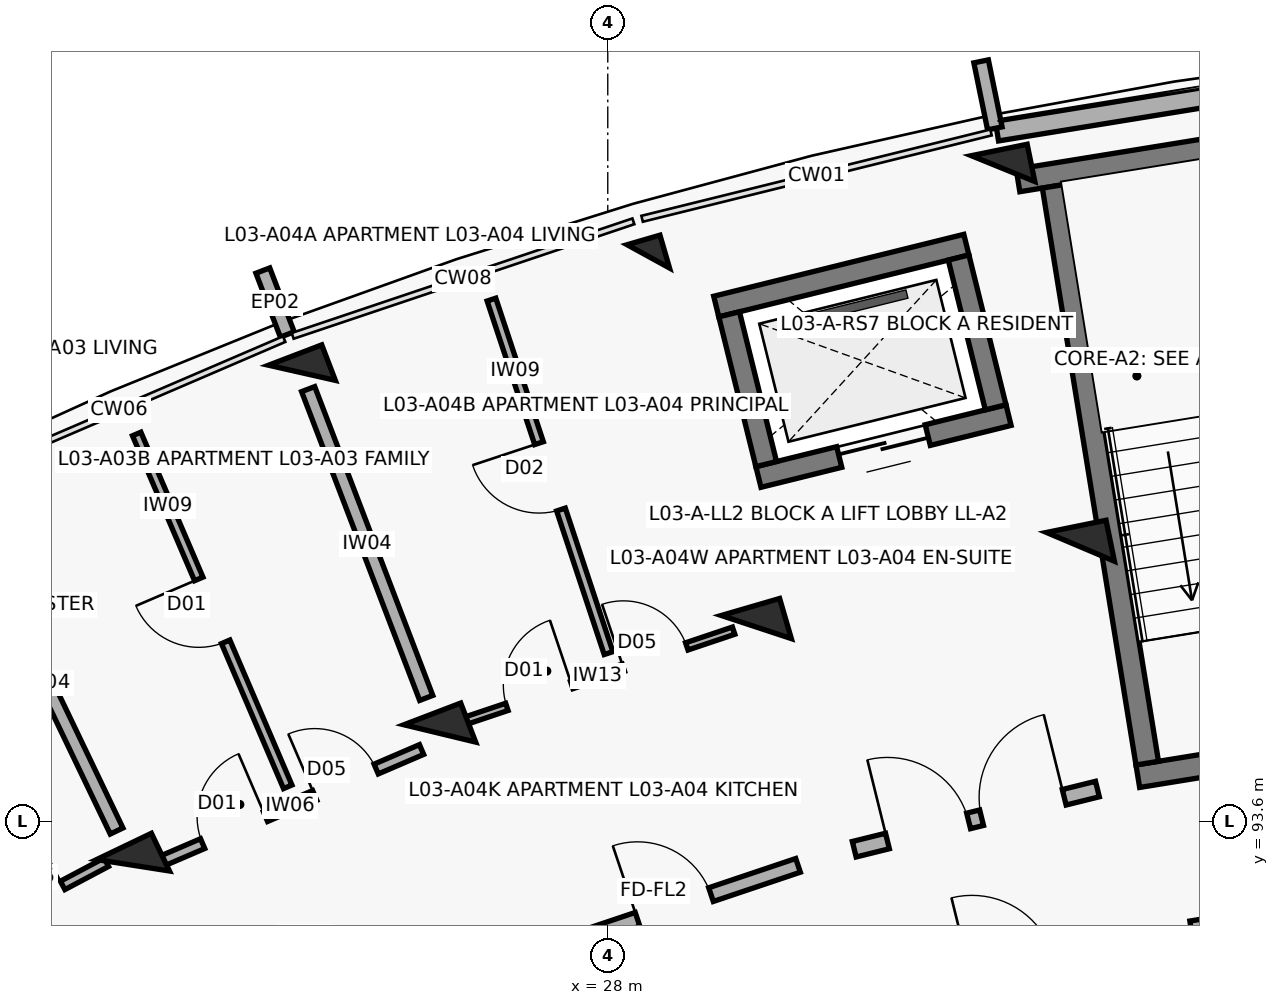
"""IFC4 building model, lengths in metres.
Left out: names, types, materials, properties, quantities, classifications, styles, units other than length and angle.
Written with IfcOpenShell. Run it as: python <this file> out.ifc"""

import sys

from ifc_helpers import new_model, si_unit, direction, frame, frame_2d, origin, origin_2d, place, context, subcontext, project, spatial, rectangle, extrude, element, fill, save


model = new_model("IFC4")
c1 = context("Model", 3, precision=1e-05, world=origin(), true_north=direction((0.0, 1.0)))
c2 = subcontext(c1, "Body", "Model", "MODEL_VIEW")
j1 = project(units=[si_unit("LENGTHUNIT", "METRE"), si_unit("PLANEANGLEUNIT", "RADIAN")], contexts=[c1])
p1 = place(None, origin())
s1 = spatial("IfcSite", under=j1, at=p1, CompositionType="ELEMENT")
p2 = place(p1, origin())
s2 = spatial("IfcBuilding", under=s1, at=p2, CompositionType="ELEMENT")
p3 = place(p2, frame((0.0, 0.0, 11.2)))
s3 = spatial("IfcBuildingStorey", under=s2, at=p3, CompositionType="ELEMENT", Elevation=11.2)
for number, where, z_axis, x_axis in (
    (1, (21.754, 93.019, 0.0), (0.0, 0.0, 1.0), (-0.432, 0.902, 0.0)),
    (2, (25.79, 94.753, 0.0), (0.0, 0.0, 1.0), (-0.357, 0.934, 0.0)),
):
    element("IfcColumn", number, at=place(p3, frame(where, z_axis=z_axis, x_axis=x_axis)), inside=s3, PredefinedType="COLUMN", context=c2, shape_type="SweptSolid", body=[
        extrude(rectangle(XDim=0.55, YDim=0.8, at=origin_2d()), origin(), (0.0, 0.0, 1.0), 3.1),
    ])
p4 = place(p3, frame((23.976, 99.499, 0.0), z_axis=(0.0, 0.0, 1.0), x_axis=(-0.357064076459, 0.934079892355, 0.0)))
e3 = element("IfcColumn", 3, at=p4, inside=s3, PredefinedType="COLUMN", context=c2, shape_type="SweptSolid", body=[
    extrude(rectangle(XDim=0.5, YDim=0.75, at=origin_2d()), origin(), (0.0, 0.0, 1.0), 3.1),
])
p5 = place(p3, frame((29.954, 96.153, 0.0), z_axis=(0.0, 0.0, 1.0), x_axis=(-0.27966144946, 0.96009867914, 0.0)))
e4 = element("IfcColumn", 4, at=p5, inside=s3, PredefinedType="COLUMN", context=c2, shape_type="SweptSolid", body=[
    extrude(rectangle(XDim=0.55, YDim=0.8, at=origin_2d()), origin(), (0.0, 0.0, 1.0), 3.1),
])
p6 = place(p3, frame((28.533, 101.031, 0.0), z_axis=(0.0, 0.0, 1.0), x_axis=(-0.27966144946, 0.96009867914, 0.0)))
e5 = element("IfcColumn", 5, at=p6, inside=s3, PredefinedType="COLUMN", context=c2, shape_type="SweptSolid", body=[
    extrude(rectangle(XDim=0.45, YDim=0.45, at=origin_2d()), origin(), (0.0, 0.0, 1.0), 3.1),
])
p7 = place(p3, frame((34.219, 97.209, 0.0), z_axis=(0.0, 0.0, 1.0), x_axis=(-0.200393999665, 0.979715389742, 0.0)))
e6 = element("IfcColumn", 6, at=p7, inside=s3, PredefinedType="COLUMN", context=c2, shape_type="SweptSolid", body=[
    extrude(rectangle(XDim=0.55, YDim=0.8, at=origin_2d()), origin(), (0.0, 0.0, 1.0), 3.1),
])
p8 = place(p3, frame((33.201, 102.186, 0.0), z_axis=(0.0, 0.0, 1.0), x_axis=(-0.200393999665, 0.979715389742, 0.0)))
e7 = element("IfcColumn", 7, at=p8, inside=s3, PredefinedType="COLUMN", context=c2, shape_type="SweptSolid", body=[
    extrude(rectangle(XDim=0.5, YDim=0.75, at=origin_2d()), origin(), (0.0, 0.0, 1.0), 3.1),
])
p9 = place(p3, frame((23.783, 100.003, 0.0), z_axis=(0.0, 0.0, 1.0), x_axis=(-0.356942580168, 0.934126326823, 0.0)))
e8 = element("IfcWall", 8, at=p9, inside=s3, PredefinedType="PARAPET", context=c2, shape_type="SweptSolid", body=[
    extrude(rectangle(XDim=0.9, YDim=0.195, at=frame_2d((0.45, 0.0))), origin(), (0.0, 0.0, 1.0), 2.25),
])
p10 = place(p3, frame((33.12, 102.679, 0.0), z_axis=(0.0, 0.0, 1.0), x_axis=(0.987080750493, 0.160223568819, 0.0)))
e9 = element("IfcWall", 9, at=p10, inside=s3, PredefinedType="SOLIDWALL", context=c2, shape_type="SweptSolid", body=[
    extrude(rectangle(XDim=4.809, YDim=0.262, at=frame_2d((2.404, 0.0))), origin(), (0.0, 0.0, 1.0), 2.25),
])
p11 = place(p3, frame((33.093, 102.715, 0.0), z_axis=(0.0, 0.0, 1.0), x_axis=(-0.200183211319, 0.979758481416, 0.0)))
e10 = element("IfcWall", 10, at=p11, inside=s3, PredefinedType="PARAPET", context=c2, shape_type="SweptSolid", body=[
    extrude(rectangle(XDim=0.9, YDim=0.195, at=frame_2d((0.45, 0.0))), origin(), (0.0, 0.0, 1.0), 2.25),
])
p12 = place(p3, frame((38.794, 94.811, 0.0), z_axis=(0.0, 0.0, 1.0), x_axis=(-0.987077443397, -0.160243941341, 0.0)))
e11 = element("IfcWall", 11, at=p12, inside=s3, PredefinedType="SHEAR", context=c2, shape_type="SweptSolid", body=[
    extrude(rectangle(XDim=3.87, YDim=0.3, at=frame_2d((1.935, 0.0))), origin(), (0.0, 0.0, 1.0), 3.1),
])
p13 = place(p12, frame((1.435, 0.0, 0.0)))
e12 = element("IfcOpeningElement", 12, at=p13, cuts=e11, PredefinedType="OPENING", context=c2, shape_type="SweptSolid", body=[
    extrude(rectangle(XDim=1.0, YDim=2.15, at=frame_2d((0.5, 1.075))), frame((0.0, 0.16, 0.0), z_axis=(0.0, -1.0, 0.0), x_axis=(1.0, 0.0, 0.0)), (0.0, 0.0, 1.0), 0.32),
])
p14 = place(p3, frame((37.81, 102.745, 0.0), z_axis=(0.0, 0.0, 1.0), x_axis=(-0.987084710126, -0.160199173019, 0.0)))
e13 = element("IfcWall", 13, at=p14, inside=s3, PredefinedType="SHEAR", context=c2, shape_type="SweptSolid", body=[
    extrude(rectangle(XDim=4.47, YDim=0.3, at=frame_2d((2.235, 0.0))), origin(), (0.0, 0.0, 1.0), 3.1),
])
p15 = place(p3, frame((35.098, 94.363, 0.0), z_axis=(0.0, 0.0, 1.0), x_axis=(-0.160227496777, 0.987080112897, 0.0)))
e14 = element("IfcWall", 14, at=p15, inside=s3, PredefinedType="SHEAR", context=c2, shape_type="SweptSolid", body=[
    extrude(rectangle(XDim=7.69, YDim=0.3, at=frame_2d((3.845, 0.0))), origin(), (0.0, 0.0, 1.0), 3.1),
])
p16 = place(p3, frame((33.273, 98.942, 0.0), z_axis=(0.0, 0.0, 1.0), x_axis=(-0.970707542441, -0.240264160972, 0.0)))
e15 = element("IfcWall", 15, at=p16, inside=s3, PredefinedType="SHEAR", context=c2, shape_type="SweptSolid", body=[
    extrude(rectangle(XDim=3.39, YDim=0.28, at=frame_2d((1.695, 0.0))), origin(), (0.0, 0.0, 1.0), 3.1),
])
p17 = place(p16, frame((1.095, 0.0, 0.0)))
e16 = element("IfcOpeningElement", 16, at=p17, cuts=e15, PredefinedType="OPENING", context=c2, shape_type="SweptSolid", body=[
    extrude(rectangle(XDim=1.2, YDim=2.15, at=frame_2d((0.6, 1.075))), frame((0.0, 0.15, 0.0), z_axis=(0.0, -1.0, 0.0), x_axis=(1.0, 0.0, 0.0)), (0.0, 0.0, 1.0), 0.3),
])
p18 = place(p3, frame((32.718, 101.185, 0.0), z_axis=(0.0, 0.0, 1.0), x_axis=(-0.970711699588, -0.240247364777, 0.0)))
e17 = element("IfcWall", 17, at=p18, inside=s3, PredefinedType="SHEAR", context=c2, shape_type="SweptSolid", body=[
    extrude(rectangle(XDim=3.39, YDim=0.28, at=frame_2d((1.695, 0.0))), origin(), (0.0, 0.0, 1.0), 3.1),
])
p19 = place(p3, frame((33.104, 99.044, 0.0), z_axis=(0.0, 0.0, 1.0), x_axis=(-0.240186044774, 0.970726873995, 0.0)))
e18 = element("IfcWall", 18, at=p19, inside=s3, PredefinedType="SHEAR", context=c2, shape_type="SweptSolid", body=[
    extrude(rectangle(XDim=2.03, YDim=0.28, at=frame_2d((1.015, 0.0))), origin(), (0.0, 0.0, 1.0), 3.1),
])
p20 = place(p3, frame((30.085, 98.297, 0.0), z_axis=(0.0, 0.0, 1.0), x_axis=(-0.2402993748, 0.970698825832, 0.0)))
e19 = element("IfcWall", 19, at=p20, inside=s3, PredefinedType="SHEAR", context=c2, shape_type="SweptSolid", body=[
    extrude(rectangle(XDim=2.03, YDim=0.28, at=frame_2d((1.015, 0.0))), origin(), (0.0, 0.0, 1.0), 3.1),
])
p21 = place(p3, frame((18.037, 91.273, 0.0), z_axis=(0.0, 0.0, 1.0), x_axis=(0.883441603894, 0.468541281543, 0.0)))
e20 = element("IfcWall", 20, at=p21, inside=s3, PredefinedType="PARTITIONING", context=c2, shape_type="SweptSolid", body=[
    extrude(rectangle(XDim=3.81, YDim=0.125, at=frame_2d((1.905, 0.0))), origin(), (0.0, 0.0, 1.0), 2.08),
])
p22 = place(p21, frame((0.65, 0.0, 0.0)))
e21 = element("IfcOpeningElement", 21, at=p22, cuts=e20, PredefinedType="OPENING", context=c2, shape_type="SweptSolid", body=[
    extrude(rectangle(XDim=0.9, YDim=2.1, at=frame_2d((0.45, 1.05))), frame((0.0, 0.073, 0.0), z_axis=(0.0, -1.0, 0.0), x_axis=(1.0, 0.0, 0.0)), (0.0, 0.0, 1.0), 0.145),
])
p23 = place(p21, frame((2.28, 0.0, 0.0)))
e22 = element("IfcOpeningElement", 22, at=p23, cuts=e20, PredefinedType="OPENING", context=c2, shape_type="SweptSolid", body=[
    extrude(rectangle(XDim=0.88, YDim=2.1, at=frame_2d((0.44, 1.05))), frame((0.0, 0.073, 0.0), z_axis=(0.0, -1.0, 0.0), x_axis=(1.0, 0.0, 0.0)), (0.0, 0.0, 1.0), 0.145),
])
p24 = place(p3, frame((22.073, 93.047, 0.0), z_axis=(0.0, 0.0, 1.0), x_axis=(0.918737522346, 0.394868794707, 0.0)))
e23 = element("IfcWall", 23, at=p24, inside=s3, PredefinedType="PARTITIONING", context=c2, shape_type="SweptSolid", body=[
    extrude(rectangle(XDim=3.785, YDim=0.14, at=frame_2d((1.893, 0.0))), origin(), (0.0, 0.0, 1.0), 2.08),
])
p25 = place(p24, frame((0.65, 0.0, 0.0)))
e24 = element("IfcOpeningElement", 24, at=p25, cuts=e23, PredefinedType="OPENING", context=c2, shape_type="SweptSolid", body=[
    extrude(rectangle(XDim=0.9, YDim=2.1, at=frame_2d((0.45, 1.05))), frame((0.0, 0.08, 0.0), z_axis=(0.0, -1.0, 0.0), x_axis=(1.0, 0.0, 0.0)), (0.0, 0.0, 1.0), 0.16),
])
p26 = place(p24, frame((2.255, 0.0, 0.0)))
e25 = element("IfcOpeningElement", 25, at=p26, cuts=e23, PredefinedType="OPENING", context=c2, shape_type="SweptSolid", body=[
    extrude(rectangle(XDim=0.88, YDim=2.1, at=frame_2d((0.44, 1.05))), frame((0.0, 0.08, 0.0), z_axis=(0.0, -1.0, 0.0), x_axis=(1.0, 0.0, 0.0)), (0.0, 0.0, 1.0), 0.16),
])
p27 = place(p3, frame((23.789, 94.051, 0.0), z_axis=(0.0, 0.0, 1.0), x_axis=(-0.393539995583, 0.919307495823, 0.0)))
e26 = element("IfcWall", 26, at=p27, inside=s3, PredefinedType="PARTITIONING", context=c2, shape_type="SweptSolid", body=[
    extrude(rectangle(XDim=5.05, YDim=0.12, at=frame_2d((2.525, 0.0))), origin(), (0.0, 0.0, 1.0), 2.08),
])
p28 = place(p27, frame((2.075, 0.0, 0.0)))
e27 = element("IfcOpeningElement", 27, at=p28, cuts=e26, PredefinedType="OPENING", context=c2, shape_type="SweptSolid", body=[
    extrude(rectangle(XDim=0.9, YDim=2.1, at=frame_2d((0.45, 1.05))), frame((0.0, 0.07, 0.0), z_axis=(0.0, -1.0, 0.0), x_axis=(1.0, 0.0, 0.0)), (0.0, 0.0, 1.0), 0.14),
])
p29 = place(p3, frame((21.538, 93.469, 0.0), z_axis=(0.0, 0.0, 1.0), x_axis=(-0.432086898897, 0.901831975371, 0.0)))
e28 = element("IfcWall", 28, at=p29, inside=s3, PredefinedType="SOLIDWALL", context=c2, shape_type="SweptSolid", body=[
    extrude(rectangle(XDim=4.35, YDim=0.185, at=frame_2d((2.175, 0.0))), origin(), (0.0, 0.0, 1.0), 2.08),
])
p30 = place(p3, frame((27.247, 91.923, 0.0), z_axis=(0.0, 0.0, 1.0), x_axis=(0.947863007629, 0.318678080151, 0.0)))
e29 = element("IfcWall", 29, at=p30, inside=s3, PredefinedType="SOLIDWALL", context=c2, shape_type="SweptSolid", body=[
    extrude(rectangle(XDim=3.436, YDim=0.19, at=frame_2d((1.718, 0.0))), origin(), (0.0, 0.0, 1.0), 2.08),
])
p31 = place(p30, frame((1.208, 0.0, 0.0)))
e30 = element("IfcOpeningElement", 30, at=p31, cuts=e29, PredefinedType="OPENING", context=c2, shape_type="SweptSolid", body=[
    extrude(rectangle(XDim=1.02, YDim=2.15, at=frame_2d((0.51, 1.075))), frame((0.0, 0.105, 0.0), z_axis=(0.0, -1.0, 0.0), x_axis=(1.0, 0.0, 0.0)), (0.0, 0.0, 1.0), 0.21),
])
p32 = place(p3, frame((26.056, 94.896, 0.0), z_axis=(0.0, 0.0, 1.0), x_axis=(0.947876567739, 0.318637744673, 0.0)))
e31 = element("IfcWall", 31, at=p32, inside=s3, PredefinedType="PARTITIONING", context=c2, shape_type="SweptSolid", body=[
    extrude(rectangle(XDim=3.797, YDim=0.1, at=frame_2d((1.899, 0.0))), origin(), (0.0, 0.0, 1.0), 2.08),
])
p33 = place(p32, frame((0.65, 0.0, 0.0)))
e32 = element("IfcOpeningElement", 32, at=p33, cuts=e31, PredefinedType="OPENING", context=c2, shape_type="SweptSolid", body=[
    extrude(rectangle(XDim=0.9, YDim=2.1, at=frame_2d((0.45, 1.05))), frame((0.0, 0.06, 0.0), z_axis=(0.0, -1.0, 0.0), x_axis=(1.0, 0.0, 0.0)), (0.0, 0.0, 1.0), 0.12),
])
p34 = place(p32, frame((2.267, 0.0, 0.0)))
e33 = element("IfcOpeningElement", 33, at=p34, cuts=e31, PredefinedType="OPENING", context=c2, shape_type="SweptSolid", body=[
    extrude(rectangle(XDim=0.88, YDim=2.1, at=frame_2d((0.44, 1.05))), frame((0.0, 0.06, 0.0), z_axis=(0.0, -1.0, 0.0), x_axis=(1.0, 0.0, 0.0)), (0.0, 0.0, 1.0), 0.12),
])
p35 = place(p3, frame((28.01, 95.81, 0.0), z_axis=(0.0, 0.0, 1.0), x_axis=(-0.314343770763, 0.949309219266, 0.0)))
e34 = element("IfcWall", 34, at=p35, inside=s3, PredefinedType="PARTITIONING", context=c2, shape_type="SweptSolid", body=[
    extrude(rectangle(XDim=4.9, YDim=0.12, at=frame_2d((2.45, 0.0))), origin(), (0.0, 0.0, 1.0), 2.08),
])
p36 = place(p35, frame((1.99, 0.0, 0.0)))
e35 = element("IfcOpeningElement", 35, at=p36, cuts=e34, PredefinedType="OPENING", context=c2, shape_type="SweptSolid", body=[
    extrude(rectangle(XDim=0.92, YDim=2.1, at=frame_2d((0.46, 1.05))), frame((0.0, 0.07, 0.0), z_axis=(0.0, -1.0, 0.0), x_axis=(1.0, 0.0, 0.0)), (0.0, 0.0, 1.0), 0.14),
])
p37 = place(p3, frame((25.611, 95.22, 0.0), z_axis=(0.0, 0.0, 1.0), x_axis=(-0.357064016205, 0.934079915388, 0.0)))
e36 = element("IfcWall", 36, at=p37, inside=s3, PredefinedType="SOLIDWALL", context=c2, shape_type="SweptSolid", body=[
    extrude(rectangle(XDim=4.35, YDim=0.185, at=frame_2d((2.175, 0.0))), origin(), (0.0, 0.0, 1.0), 2.08),
])
p38 = place(p3, frame((31.243, 93.23, 0.0), z_axis=(0.0, 0.0, 1.0), x_axis=(0.970719238682, 0.240216901263, 0.0)))
e37 = element("IfcWall", 37, at=p38, inside=s3, PredefinedType="SOLIDWALL", context=c2, shape_type="SweptSolid", body=[
    extrude(rectangle(XDim=3.296, YDim=0.21, at=frame_2d((1.648, 0.0))), origin(), (0.0, 0.0, 1.0), 2.08),
])
p39 = place(p38, frame((0.45, 0.0, 0.0)))
e38 = element("IfcOpeningElement", 38, at=p39, cuts=e37, PredefinedType="OPENING", context=c2, shape_type="SweptSolid", body=[
    extrude(rectangle(XDim=1.1, YDim=2.15, at=frame_2d((0.55, 1.075))), frame((0.0, 0.115, 0.0), z_axis=(0.0, -1.0, 0.0), x_axis=(1.0, 0.0, 0.0)), (0.0, 0.0, 1.0), 0.23),
])
p40 = place(p38, frame((1.726, 0.0, 0.0)))
e39 = element("IfcOpeningElement", 39, at=p40, cuts=e37, PredefinedType="OPENING", context=c2, shape_type="SweptSolid", body=[
    extrude(rectangle(XDim=1.12, YDim=2.15, at=frame_2d((0.56, 1.075))), frame((0.0, 0.115, 0.0), z_axis=(0.0, -1.0, 0.0), x_axis=(1.0, 0.0, 0.0)), (0.0, 0.0, 1.0), 0.23),
])
p41 = place(p3, frame((35.676, 92.181, 0.0), z_axis=(0.0, 0.0, 1.0), x_axis=(0.98707079686, 0.160284877599, 0.0)))
e40 = element("IfcWall", 40, at=p41, inside=s3, PredefinedType="SOLIDWALL", context=c2, shape_type="SweptSolid", body=[
    extrude(rectangle(XDim=3.129, YDim=0.21, at=frame_2d((1.564, 0.0))), origin(), (0.0, 0.0, 1.0), 2.08),
])
p42 = place(p41, frame((1.014, 0.0, 0.0)))
e41 = element("IfcOpeningElement", 41, at=p42, cuts=e40, PredefinedType="OPENING", context=c2, shape_type="SweptSolid", body=[
    extrude(rectangle(XDim=1.1, YDim=2.15, at=frame_2d((0.55, 1.075))), frame((0.0, 0.115, 0.0), z_axis=(0.0, -1.0, 0.0), x_axis=(1.0, 0.0, 0.0)), (0.0, 0.0, 1.0), 0.23),
])
p43 = place(p17, origin())
e42 = element("IfcDoor", 42, at=p43, inside=s3, OperationType="DOUBLE_DOOR_SLIDING", PredefinedType="DOOR", context=c2, shape_type="SweptSolid", body=[
    extrude(rectangle(XDim=1.2, YDim=2.15, at=frame_2d((0.6, 1.075))), frame((0.0, 0.025, 0.0), z_axis=(0.0, -1.0, 0.0), x_axis=(1.0, 0.0, 0.0)), (0.0, 0.0, 1.0), 0.05),
])
fill(e16, e42)
p44 = place(p23, origin())
e43 = element("IfcDoor", 43, at=p44, inside=s3, OperationType="SINGLE_SWING_RIGHT", PredefinedType="DOOR", context=c2, shape_type="SweptSolid", body=[
    extrude(rectangle(XDim=0.88, YDim=2.1, at=frame_2d((0.44, 1.05))), frame((0.0, 0.025, 0.0), z_axis=(0.0, -1.0, 0.0), x_axis=(1.0, 0.0, 0.0)), (0.0, 0.0, 1.0), 0.05),
])
fill(e22, e43)
p45 = place(p25, origin())
e44 = element("IfcDoor", 44, at=p45, inside=s3, OperationType="SINGLE_SWING_RIGHT", PredefinedType="DOOR", context=c2, shape_type="SweptSolid", body=[
    extrude(rectangle(XDim=0.9, YDim=2.1, at=frame_2d((0.45, 1.05))), frame((0.0, 0.025, 0.0), z_axis=(0.0, -1.0, 0.0), x_axis=(1.0, 0.0, 0.0)), (0.0, 0.0, 1.0), 0.05),
])
fill(e24, e44)
p46 = place(p26, origin())
e45 = element("IfcDoor", 45, at=p46, inside=s3, OperationType="SINGLE_SWING_LEFT", PredefinedType="DOOR", context=c2, shape_type="SweptSolid", body=[
    extrude(rectangle(XDim=0.88, YDim=2.1, at=frame_2d((0.44, 1.05))), frame((0.0, 0.025, 0.0), z_axis=(0.0, -1.0, 0.0), x_axis=(1.0, 0.0, 0.0)), (0.0, 0.0, 1.0), 0.05),
])
fill(e25, e45)
p47 = place(p28, origin())
e46 = element("IfcDoor", 46, at=p47, inside=s3, OperationType="SINGLE_SWING_RIGHT", PredefinedType="DOOR", context=c2, shape_type="SweptSolid", body=[
    extrude(rectangle(XDim=0.9, YDim=2.1, at=frame_2d((0.45, 1.05))), frame((0.0, 0.025, 0.0), z_axis=(0.0, -1.0, 0.0), x_axis=(1.0, 0.0, 0.0)), (0.0, 0.0, 1.0), 0.05),
])
fill(e27, e46)
p48 = place(p31, origin())
e47 = element("IfcDoor", 47, at=p48, inside=s3, OperationType="SINGLE_SWING_LEFT", PredefinedType="DOOR", context=c2, shape_type="SweptSolid", body=[
    extrude(rectangle(XDim=1.02, YDim=2.15, at=frame_2d((0.51, 1.075))), frame((0.0, 0.025, 0.0), z_axis=(0.0, -1.0, 0.0), x_axis=(1.0, 0.0, 0.0)), (0.0, 0.0, 1.0), 0.05),
])
fill(e30, e47)
p49 = place(p33, origin())
e48 = element("IfcDoor", 48, at=p49, inside=s3, OperationType="SINGLE_SWING_RIGHT", PredefinedType="DOOR", context=c2, shape_type="SweptSolid", body=[
    extrude(rectangle(XDim=0.9, YDim=2.1, at=frame_2d((0.45, 1.05))), frame((0.0, 0.025, 0.0), z_axis=(0.0, -1.0, 0.0), x_axis=(1.0, 0.0, 0.0)), (0.0, 0.0, 1.0), 0.05),
])
fill(e32, e48)
p50 = place(p34, origin())
e49 = element("IfcDoor", 49, at=p50, inside=s3, OperationType="SINGLE_SWING_LEFT", PredefinedType="DOOR", context=c2, shape_type="SweptSolid", body=[
    extrude(rectangle(XDim=0.88, YDim=2.1, at=frame_2d((0.44, 1.05))), frame((0.0, 0.025, 0.0), z_axis=(0.0, -1.0, 0.0), x_axis=(1.0, 0.0, 0.0)), (0.0, 0.0, 1.0), 0.05),
])
fill(e33, e49)
p51 = place(p36, origin())
e50 = element("IfcDoor", 50, at=p51, inside=s3, OperationType="SINGLE_SWING_RIGHT", PredefinedType="DOOR", context=c2, shape_type="SweptSolid", body=[
    extrude(rectangle(XDim=0.92, YDim=2.1, at=frame_2d((0.46, 1.05))), frame((0.0, 0.025, 0.0), z_axis=(0.0, -1.0, 0.0), x_axis=(1.0, 0.0, 0.0)), (0.0, 0.0, 1.0), 0.05),
])
fill(e35, e50)
p52 = place(p39, origin())
e51 = element("IfcDoor", 51, at=p52, inside=s3, OperationType="SINGLE_SWING_LEFT", PredefinedType="DOOR", context=c2, shape_type="SweptSolid", body=[
    extrude(rectangle(XDim=1.1, YDim=2.15, at=frame_2d((0.55, 1.075))), frame((0.0, 0.025, 0.0), z_axis=(0.0, -1.0, 0.0), x_axis=(1.0, 0.0, 0.0)), (0.0, 0.0, 1.0), 0.05),
])
fill(e38, e51)
p53 = place(p40, origin())
e52 = element("IfcDoor", 52, at=p53, inside=s3, OperationType="SINGLE_SWING_RIGHT", PredefinedType="DOOR", context=c2, shape_type="SweptSolid", body=[
    extrude(rectangle(XDim=1.12, YDim=2.15, at=frame_2d((0.56, 1.075))), frame((0.0, 0.025, 0.0), z_axis=(0.0, -1.0, 0.0), x_axis=(1.0, 0.0, 0.0)), (0.0, 0.0, 1.0), 0.05),
])
fill(e39, e52)
save(model, sys.argv[1])
